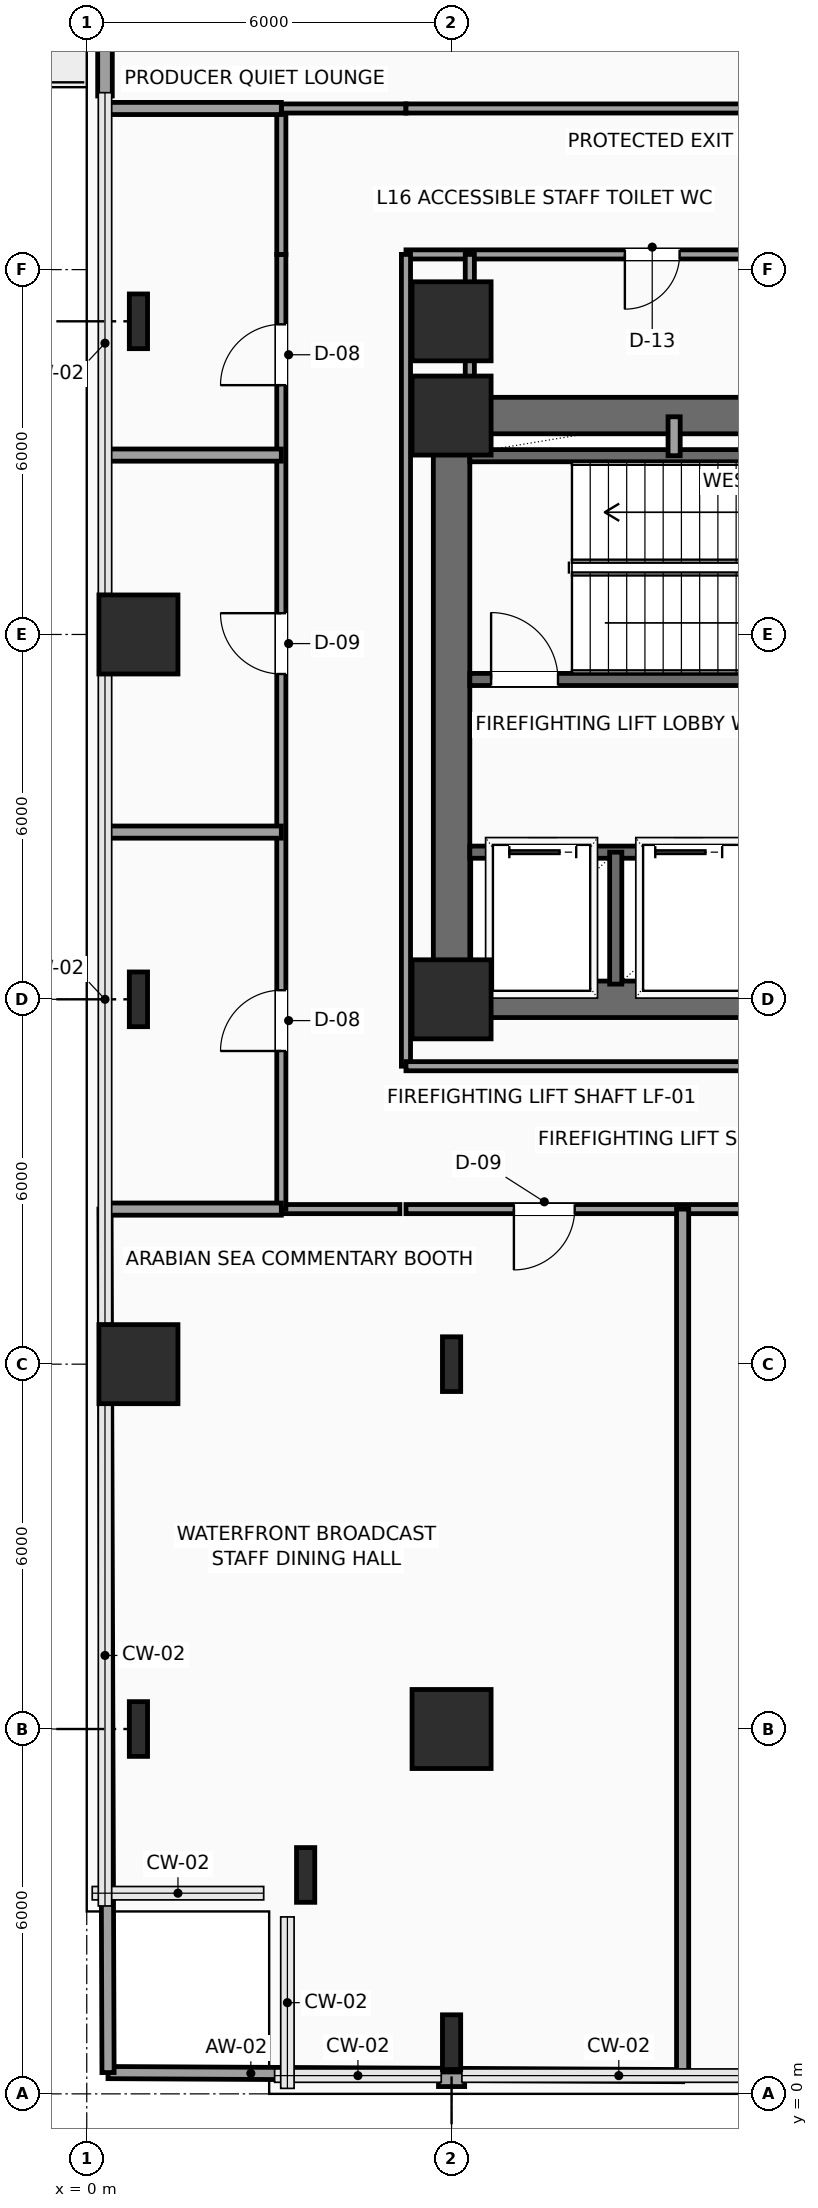
"""IFC4 building model, lengths in metres.
Left out: names, types, materials, properties, quantities, classifications, styles, units other than length and angle.
Written with IfcOpenShell. Run it as: python <this file> out.ifc"""

import sys

from ifc_helpers import new_model, si_unit, direction, frame, frame_2d, origin, origin_2d, place, context, subcontext, project, spatial, rectangle, i_section, extrude, element, fill, save


model = new_model("IFC4")
c1 = context("Model", 3, precision=1e-05, world=origin(), true_north=direction((0.0, 1.0)))
c2 = subcontext(c1, "Body", "Model", "MODEL_VIEW")
j1 = project(units=[si_unit("LENGTHUNIT", "METRE"), si_unit("PLANEANGLEUNIT", "RADIAN")], contexts=[c1])
p1 = place(None, origin())
s1 = spatial("IfcSite", under=j1, at=p1, CompositionType="ELEMENT")
p2 = place(p1, origin())
s2 = spatial("IfcBuilding", under=s1, at=p2, CompositionType="ELEMENT")
p3 = place(p2, frame((0.0, 0.0, 71.4)))
s3 = spatial("IfcBuildingStorey", under=s2, at=p3, CompositionType="ELEMENT", Elevation=71.4)
for number, where, z_axis, x_axis in (
    (1, (6.0, 18.0, 0.0), (0.0, 0.0, 1.0), (1.0, 0.0, 0.0)),
    (2, (6.0, 27.6, 0.0), (0.0, 0.0, 1.0), (1.0, 0.0, 0.0)),
):
    element("IfcColumn", number, at=place(p3, frame(where, z_axis=z_axis, x_axis=x_axis)), inside=s3, PredefinedType="COLUMN", context=c2, shape_type="SweptSolid", body=[
        extrude(rectangle(XDim=1.3, YDim=1.3, at=origin_2d()), origin(), (0.0, 0.0, 1.0), 3.9),
    ])
for number, where, z_axis, x_axis in (
    (3, (3.6, 3.6, 0.0), (0.0, 0.0, 1.0), (1.0, 0.0, 0.0)),
    (4, (0.85, 6.0, 0.0), (0.0, 0.0, 1.0), (1.0, 0.0, 0.0)),
):
    element("IfcColumn", number, at=place(p3, frame(where, z_axis=z_axis, x_axis=x_axis)), inside=s3, PredefinedType="COLUMN", context=c2, shape_type="SweptSolid", body=[
        extrude(i_section(OverallWidth=0.3, OverallDepth=0.9, WebThickness=0.019, FlangeThickness=0.035, FilletRadius=0.03, at=origin_2d()), origin(), (0.0, 0.0, 1.0), 3.9),
    ])
p4 = place(p3, frame((0.85, 12.0, 0.0), z_axis=(0.0, 0.0, 1.0), x_axis=(1.0, 0.0, 0.0)))
e5 = element("IfcColumn", 5, at=p4, inside=s3, PredefinedType="COLUMN", context=c2, shape_type="SweptSolid", body=[
    extrude(rectangle(XDim=1.3, YDim=1.3, at=origin_2d()), origin(), (0.0, 0.0, 1.0), 3.9),
])
p5 = place(p3, frame((0.85, 18.0, 0.0), z_axis=(0.0, 0.0, 1.0), x_axis=(1.0, 0.0, 0.0)))
e6 = element("IfcColumn", 6, at=p5, inside=s3, PredefinedType="COLUMN", context=c2, shape_type="SweptSolid", body=[
    extrude(i_section(OverallWidth=0.3, OverallDepth=0.9, WebThickness=0.019, FlangeThickness=0.035, FilletRadius=0.03, at=origin_2d()), origin(), (0.0, 0.0, 1.0), 3.9),
])
p6 = place(p3, frame((0.85, 24.0, 0.0), z_axis=(0.0, 0.0, 1.0), x_axis=(1.0, 0.0, 0.0)))
e7 = element("IfcColumn", 7, at=p6, inside=s3, PredefinedType="COLUMN", context=c2, shape_type="SweptSolid", body=[
    extrude(rectangle(XDim=1.3, YDim=1.3, at=origin_2d()), origin(), (0.0, 0.0, 1.0), 3.9),
])
for number, where, z_axis, x_axis in (
    (8, (0.85, 29.15, 0.0), (0.0, 0.0, 1.0), (1.0, 0.0, 0.0)),
    (9, (6.0, 0.85, 0.0), (0.0, 0.0, 1.0), (1.0, 0.0, 0.0)),
):
    element("IfcColumn", number, at=place(p3, frame(where, z_axis=z_axis, x_axis=x_axis)), inside=s3, PredefinedType="COLUMN", context=c2, shape_type="SweptSolid", body=[
        extrude(i_section(OverallWidth=0.3, OverallDepth=0.9, WebThickness=0.019, FlangeThickness=0.035, FilletRadius=0.03, at=origin_2d()), origin(), (0.0, 0.0, 1.0), 3.9),
    ])
p7 = place(p3, frame((6.0, 6.0, 0.0), z_axis=(0.0, 0.0, 1.0), x_axis=(1.0, 0.0, 0.0)))
e10 = element("IfcColumn", 10, at=p7, inside=s3, PredefinedType="COLUMN", context=c2, shape_type="SweptSolid", body=[
    extrude(rectangle(XDim=1.3, YDim=1.3, at=origin_2d()), origin(), (0.0, 0.0, 1.0), 3.9),
])
p8 = place(p3, frame((6.0, 12.0, 0.0), z_axis=(0.0, 0.0, 1.0), x_axis=(1.0, 0.0, 0.0)))
e11 = element("IfcColumn", 11, at=p8, inside=s3, PredefinedType="COLUMN", context=c2, shape_type="SweptSolid", body=[
    extrude(i_section(OverallWidth=0.3, OverallDepth=0.9, WebThickness=0.019, FlangeThickness=0.035, FilletRadius=0.03, at=origin_2d()), origin(), (0.0, 0.0, 1.0), 3.9),
])
p9 = place(p3, frame((6.0, 29.15, 0.0), z_axis=(0.0, 0.0, 1.0), x_axis=(1.0, 0.0, 0.0)))
e12 = element("IfcColumn", 12, at=p9, inside=s3, PredefinedType="COLUMN", context=c2, shape_type="SweptSolid", body=[
    extrude(rectangle(XDim=1.3, YDim=1.3, at=origin_2d()), origin(), (0.0, 0.0, 1.0), 3.9),
])
p10 = place(p3, frame((0.3, 32.855, 0.0), z_axis=(0.0, 0.0, 1.0), x_axis=(0.0, 1.0, 0.0)))
e13 = element("IfcWall", 13, at=p10, inside=s3, PredefinedType="SOLIDWALL", context=c2, shape_type="SweptSolid", body=[
    extrude(rectangle(XDim=9.29, YDim=0.24, at=frame_2d((4.645, 0.0))), origin(), (0.0, 0.0, 1.0), 3.65),
])
p11 = place(p10, frame((4.95, 0.0, 0.0)))
e14 = element("IfcOpeningElement", 14, at=p11, cuts=e13, PredefinedType="OPENING", context=c2, shape_type="SweptSolid", body=[
    extrude(rectangle(XDim=1.05, YDim=2.2, at=frame_2d((0.525, 1.1))), frame((0.0, 0.13, 0.0), z_axis=(0.0, -1.0, 0.0), x_axis=(1.0, 0.0, 0.0)), (0.0, 0.0, 1.0), 0.26),
])
p12 = place(p3, frame((6.215, 0.24, 0.0), z_axis=(0.0, 0.0, 1.0), x_axis=(-1.0, 0.0, 0.0)))
e15 = element("IfcWall", 15, at=p12, inside=s3, PredefinedType="SOLIDWALL", context=c2, shape_type="SweptSolid", body=[
    extrude(rectangle(XDim=0.43, YDim=0.24, at=frame_2d((0.215, 0.0))), origin(), (0.0, 0.0, 1.0), 3.65),
])
p13 = place(p3, frame((6.0, 18.0, 0.0), z_axis=(0.0, 0.0, 1.0), x_axis=(1.0, 0.0, 0.0)))
e16 = element("IfcWall", 16, at=p13, inside=s3, PredefinedType="SHEAR", context=c2, shape_type="SweptSolid", body=[
    extrude(rectangle(XDim=12.0, YDim=0.6, at=frame_2d((6.0, 0.0))), origin(), (0.0, 0.0, 1.0), 3.65),
])
p14 = place(p13, frame((7.15, 0.0, 0.0)))
e17 = element("IfcOpeningElement", 17, at=p14, cuts=e16, PredefinedType="OPENING", context=c2, shape_type="SweptSolid", body=[
    extrude(rectangle(XDim=1.6, YDim=2.3, at=frame_2d((0.8, 1.15))), frame((0.0, 0.31, 0.0), z_axis=(0.0, -1.0, 0.0), x_axis=(1.0, 0.0, 0.0)), (0.0, 0.0, 1.0), 0.62),
])
p15 = place(p3, frame((6.0, 27.6, 0.0), z_axis=(0.0, 0.0, 1.0), x_axis=(1.0, 0.0, 0.0)))
e18 = element("IfcWall", 18, at=p15, inside=s3, PredefinedType="SHEAR", context=c2, shape_type="SweptSolid", body=[
    extrude(rectangle(XDim=12.0, YDim=0.6, at=frame_2d((6.0, 0.0))), origin(), (0.0, 0.0, 1.0), 3.65),
])
p16 = place(p15, frame((10.2, 0.0, 0.0)))
e19 = element("IfcOpeningElement", 19, at=p16, cuts=e18, PredefinedType="OPENING", context=c2, shape_type="SweptSolid", body=[
    extrude(rectangle(XDim=0.9, YDim=2.15, at=frame_2d((0.45, 1.075))), frame((0.0, 0.31, 0.0), z_axis=(0.0, -1.0, 0.0), x_axis=(1.0, 0.0, 0.0)), (0.0, 0.0, 1.0), 0.62),
])
p17 = place(p3, frame((6.0, 18.0, 0.0), z_axis=(0.0, 0.0, 1.0), x_axis=(0.0, 1.0, 0.0)))
e20 = element("IfcWall", 20, at=p17, inside=s3, PredefinedType="SHEAR", context=c2, shape_type="SweptSolid", body=[
    extrude(rectangle(XDim=9.6, YDim=0.6, at=frame_2d((4.8, 0.0))), origin(), (0.0, 0.0, 1.0), 3.65),
])
p18 = place(p3, frame((6.3, 23.26, 0.0), z_axis=(0.0, 0.0, 1.0), x_axis=(1.0, 0.0, 0.0)))
e21 = element("IfcWall", 21, at=p18, inside=s3, PredefinedType="SHEAR", context=c2, shape_type="SweptSolid", body=[
    extrude(rectangle(XDim=8.88, YDim=0.2, at=frame_2d((4.44, 0.0))), origin(), (0.0, 0.0, 1.0), 3.65),
])
p19 = place(p18, frame((0.35, 0.0, 0.0)))
e22 = element("IfcOpeningElement", 22, at=p19, cuts=e21, PredefinedType="OPENING", context=c2, shape_type="SweptSolid", body=[
    extrude(rectangle(XDim=1.1, YDim=2.2, at=frame_2d((0.55, 1.1))), frame((0.0, 0.11, 0.0), z_axis=(0.0, -1.0, 0.0), x_axis=(1.0, 0.0, 0.0)), (0.0, 0.0, 1.0), 0.22),
])
p20 = place(p3, frame((6.3, 26.94, 0.0), z_axis=(0.0, 0.0, 1.0), x_axis=(1.0, 0.0, 0.0)))
e23 = element("IfcWall", 23, at=p20, inside=s3, PredefinedType="SHEAR", context=c2, shape_type="SweptSolid", body=[
    extrude(rectangle(XDim=8.88, YDim=0.2, at=frame_2d((4.44, 0.0))), origin(), (0.0, 0.0, 1.0), 3.65),
])
p21 = place(p3, frame((6.3, 20.42, 0.0), z_axis=(0.0, 0.0, 1.0), x_axis=(1.0, 0.0, 0.0)))
e24 = element("IfcWall", 24, at=p21, inside=s3, PredefinedType="SHEAR", context=c2, shape_type="SweptSolid", body=[
    extrude(rectangle(XDim=4.95, YDim=0.2, at=frame_2d((2.475, 0.0))), origin(), (0.0, 0.0, 1.0), 3.65),
])
p22 = place(p21, frame((0.65, 0.0, 0.0)))
e25 = element("IfcOpeningElement", 25, at=p22, cuts=e24, PredefinedType="OPENING", context=c2, shape_type="SweptSolid", body=[
    extrude(rectangle(XDim=1.1, YDim=2.2, at=frame_2d((0.55, 1.1))), frame((0.0, 0.11, 0.0), z_axis=(0.0, -1.0, 0.0), x_axis=(1.0, 0.0, 0.0)), (0.0, 0.0, 1.0), 0.22),
])
p23 = place(p21, frame((3.05, 0.0, 0.0)))
e26 = element("IfcOpeningElement", 26, at=p23, cuts=e24, PredefinedType="OPENING", context=c2, shape_type="SweptSolid", body=[
    extrude(rectangle(XDim=1.1, YDim=2.2, at=frame_2d((0.55, 1.1))), frame((0.0, 0.11, 0.0), z_axis=(0.0, -1.0, 0.0), x_axis=(1.0, 0.0, 0.0)), (0.0, 0.0, 1.0), 0.22),
])
p24 = place(p3, frame((8.7, 18.25, 0.0), z_axis=(0.0, 0.0, 1.0), x_axis=(0.0, 1.0, 0.0)))
e27 = element("IfcWall", 27, at=p24, inside=s3, PredefinedType="SHEAR", context=c2, shape_type="SweptSolid", body=[
    extrude(rectangle(XDim=2.17, YDim=0.2, at=frame_2d((1.085, 0.0))), origin(), (0.0, 0.0, 1.0), 3.65),
])
p25 = place(p3, frame((9.66, 26.94, 0.0), z_axis=(0.0, 0.0, 1.0), x_axis=(0.0, 1.0, 0.0)))
e28 = element("IfcWall", 28, at=p25, inside=s3, PredefinedType="SOLIDWALL", context=c2, shape_type="SweptSolid", body=[
    extrude(rectangle(XDim=0.64, YDim=0.2, at=frame_2d((0.32, 0.0))), origin(), (0.0, 0.0, 1.0), 3.65),
])
p26 = place(p3, frame((12.4, 14.55, 0.0), z_axis=(0.0, 0.0, 1.0), x_axis=(-1.0, 0.0, 0.0)))
e29 = element("IfcWall", 29, at=p26, inside=s3, PredefinedType="PARTITIONING", context=c2, shape_type="SweptSolid", body=[
    extrude(rectangle(XDim=7.15, YDim=0.15, at=frame_2d((3.575, 0.0))), origin(), (0.0, 0.0, 1.0), 3.65),
])
p27 = place(p26, frame((4.375, 0.0, 0.0)))
e30 = element("IfcOpeningElement", 30, at=p27, cuts=e29, PredefinedType="OPENING", context=c2, shape_type="SweptSolid", body=[
    extrude(rectangle(XDim=1.0, YDim=2.2, at=frame_2d((0.5, 1.1))), frame((0.0, 0.085, 0.0), z_axis=(0.0, -1.0, 0.0), x_axis=(1.0, 0.0, 0.0)), (0.0, 0.0, 1.0), 0.17),
])
p28 = place(p3, frame((5.15, 14.55, 0.0), z_axis=(0.0, 0.0, 1.0), x_axis=(-1.0, 0.0, 0.0)))
e31 = element("IfcWall", 31, at=p28, inside=s3, PredefinedType="PARTITIONING", context=c2, shape_type="SweptSolid", body=[
    extrude(rectangle(XDim=1.95, YDim=0.15, at=frame_2d((0.975, 0.0))), origin(), (0.0, 0.0, 1.0), 3.65),
])
p29 = place(p3, frame((3.2, 14.55, 0.0), z_axis=(0.0, 0.0, 1.0), x_axis=(0.0, 1.0, 0.0)))
e32 = element("IfcWall", 32, at=p29, inside=s3, PredefinedType="PARTITIONING", context=c2, shape_type="SweptSolid", body=[
    extrude(rectangle(XDim=15.7, YDim=0.15, at=frame_2d((7.85, 0.0))), origin(), (0.0, 0.0, 1.0), 3.65),
])
p30 = place(p29, frame((2.6, 0.0, 0.0)))
e33 = element("IfcOpeningElement", 33, at=p30, cuts=e32, PredefinedType="OPENING", context=c2, shape_type="SweptSolid", body=[
    extrude(rectangle(XDim=1.0, YDim=2.2, at=frame_2d((0.5, 1.1))), frame((0.0, 0.085, 0.0), z_axis=(0.0, -1.0, 0.0), x_axis=(1.0, 0.0, 0.0)), (0.0, 0.0, 1.0), 0.17),
])
p31 = place(p29, frame((8.8, 0.0, 0.0)))
e34 = element("IfcOpeningElement", 34, at=p31, cuts=e32, PredefinedType="OPENING", context=c2, shape_type="SweptSolid", body=[
    extrude(rectangle(XDim=1.0, YDim=2.2, at=frame_2d((0.5, 1.1))), frame((0.0, 0.085, 0.0), z_axis=(0.0, -1.0, 0.0), x_axis=(1.0, 0.0, 0.0)), (0.0, 0.0, 1.0), 0.17),
])
p32 = place(p29, frame((13.55, 0.0, 0.0)))
e35 = element("IfcOpeningElement", 35, at=p32, cuts=e32, PredefinedType="OPENING", context=c2, shape_type="SweptSolid", body=[
    extrude(rectangle(XDim=1.0, YDim=2.2, at=frame_2d((0.5, 1.1))), frame((0.0, 0.085, 0.0), z_axis=(0.0, -1.0, 0.0), x_axis=(1.0, 0.0, 0.0)), (0.0, 0.0, 1.0), 0.17),
])
p33 = place(p3, frame((3.2, 30.25, 0.0), z_axis=(0.0, 0.0, 1.0), x_axis=(0.0, 1.0, 0.0)))
e36 = element("IfcWall", 36, at=p33, inside=s3, PredefinedType="PARTITIONING", context=c2, shape_type="SweptSolid", body=[
    extrude(rectangle(XDim=2.4, YDim=0.15, at=frame_2d((1.2, 0.0))), origin(), (0.0, 0.0, 1.0), 3.65),
])
p34 = place(p3, frame((3.2, 32.65, 0.0), z_axis=(0.0, 0.0, 1.0), x_axis=(1.0, 0.0, 0.0)))
e37 = element("IfcWall", 37, at=p34, inside=s3, PredefinedType="PARTITIONING", context=c2, shape_type="SweptSolid", body=[
    extrude(rectangle(XDim=2.05, YDim=0.15, at=frame_2d((1.025, 0.0))), origin(), (0.0, 0.0, 1.0), 3.65),
])
p35 = place(p3, frame((5.25, 32.65, 0.0), z_axis=(0.0, 0.0, 1.0), x_axis=(1.0, 0.0, 0.0)))
e38 = element("IfcWall", 38, at=p35, inside=s3, PredefinedType="PARTITIONING", context=c2, shape_type="SweptSolid", body=[
    extrude(rectangle(XDim=8.55, YDim=0.15, at=frame_2d((4.275, 0.0))), origin(), (0.0, 0.0, 1.0), 3.65),
])
p36 = place(p3, frame((15.88, 30.25, 0.0), z_axis=(0.0, 0.0, 1.0), x_axis=(-1.0, 0.0, 0.0)))
e39 = element("IfcWall", 39, at=p36, inside=s3, PredefinedType="PARTITIONING", context=c2, shape_type="SweptSolid", body=[
    extrude(rectangle(XDim=10.63, YDim=0.15, at=frame_2d((5.315, 0.0))), origin(), (0.0, 0.0, 1.0), 3.65),
])
p37 = place(p36, frame((6.13, 0.0, 0.0)))
e40 = element("IfcOpeningElement", 40, at=p37, cuts=e39, PredefinedType="OPENING", context=c2, shape_type="SweptSolid", body=[
    extrude(rectangle(XDim=0.9, YDim=2.1, at=frame_2d((0.45, 1.05))), frame((0.0, 0.085, 0.0), z_axis=(0.0, -1.0, 0.0), x_axis=(1.0, 0.0, 0.0)), (0.0, 0.0, 1.0), 0.17),
])
p38 = place(p3, frame((5.25, 30.25, 0.0), z_axis=(0.0, 0.0, 1.0), x_axis=(0.0, -1.0, 0.0)))
e41 = element("IfcWall", 41, at=p38, inside=s3, PredefinedType="PARTITIONING", context=c2, shape_type="SweptSolid", body=[
    extrude(rectangle(XDim=13.35, YDim=0.15, at=frame_2d((6.675, 0.0))), origin(), (0.0, 0.0, 1.0), 3.65),
])
p39 = place(p3, frame((5.25, 16.9, 0.0), z_axis=(0.0, 0.0, 1.0), x_axis=(1.0, 0.0, 0.0)))
e42 = element("IfcWall", 42, at=p39, inside=s3, PredefinedType="PARTITIONING", context=c2, shape_type="SweptSolid", body=[
    extrude(rectangle(XDim=7.15, YDim=0.15, at=frame_2d((3.575, 0.0))), origin(), (0.0, 0.0, 1.0), 3.65),
])
p40 = place(p3, frame((6.3, 27.68, 0.0), z_axis=(0.0, 0.0, 1.0), x_axis=(0.0, 1.0, 0.0)))
e43 = element("IfcWall", 43, at=p40, inside=s3, PredefinedType="PARTITIONING", context=c2, shape_type="SweptSolid", body=[
    extrude(rectangle(XDim=2.57, YDim=0.15, at=frame_2d((1.285, 0.0))), origin(), (0.0, 0.0, 1.0), 2.992),
])
p41 = place(p3, frame((0.35, 0.35, 0.0), z_axis=(0.0, 0.0, 1.0), x_axis=(0.99998595132, -0.005300675722, 0.0)))
e44 = element("IfcWall", 44, at=p41, inside=s3, PredefinedType="PARTITIONING", context=c2, shape_type="SweptSolid", body=[
    extrude(rectangle(XDim=5.435, YDim=0.2, at=frame_2d((2.717, 0.0))), origin(), (0.0, 0.0, 1.0), 3.65),
])
p42 = place(p3, frame((6.215, 0.319, 0.0), z_axis=(0.0, 0.0, 1.0), x_axis=(0.999985892136, -0.005311829174, 0.0)))
e45 = element("IfcWall", 45, at=p42, inside=s3, PredefinedType="PARTITIONING", context=c2, shape_type="SweptSolid", body=[
    extrude(rectangle(XDim=3.585, YDim=0.2, at=frame_2d((1.792, 0.0))), origin(), (0.0, 0.0, 1.0), 3.65),
])
p43 = place(p3, frame((0.35, 0.35, 0.0), z_axis=(0.0, 0.0, 1.0), x_axis=(-0.003524555588, 0.999993788735, 0.0)))
e46 = element("IfcWall", 46, at=p43, inside=s3, PredefinedType="PARTITIONING", context=c2, shape_type="SweptSolid", body=[
    extrude(rectangle(XDim=14.2, YDim=0.2, at=frame_2d((7.1, 0.0))), origin(), (0.0, 0.0, 1.0), 3.65),
])
p44 = place(p3, frame((9.8, 0.3, 0.0), z_axis=(0.0, 0.0, 1.0), x_axis=(0.0, 1.0, 0.0)))
e47 = element("IfcWall", 47, at=p44, inside=s3, PredefinedType="PARTITIONING", context=c2, shape_type="SweptSolid", body=[
    extrude(rectangle(XDim=14.25, YDim=0.2, at=frame_2d((7.125, 0.0))), origin(), (0.0, 0.0, 1.0), 3.65),
])
p45 = place(p3, frame((0.3, 14.55, 0.0), z_axis=(0.0, 0.0, 1.0), x_axis=(1.0, 0.0, 0.0)))
e48 = element("IfcWall", 48, at=p45, inside=s3, PredefinedType="PARTITIONING", context=c2, shape_type="SweptSolid", body=[
    extrude(rectangle(XDim=2.9, YDim=0.2, at=frame_2d((1.45, 0.0))), origin(), (0.0, 0.0, 1.0), 3.65),
])
p46 = place(p3, frame((0.3, 20.75, 0.0), z_axis=(0.0, 0.0, 1.0), x_axis=(1.0, 0.0, 0.0)))
e49 = element("IfcWall", 49, at=p46, inside=s3, PredefinedType="PARTITIONING", context=c2, shape_type="SweptSolid", body=[
    extrude(rectangle(XDim=2.9, YDim=0.2, at=frame_2d((1.45, 0.0))), origin(), (0.0, 0.0, 1.0), 3.142),
])
for number, where, z_axis, x_axis in (
    (50, (0.3, 26.95, 0.0), (0.0, 0.0, 1.0), (1.0, 0.0, 0.0)),
    (51, (0.3, 32.65, 0.0), (0.0, 0.0, 1.0), (1.0, 0.0, 0.0)),
):
    element("IfcWall", number, at=place(p3, frame(where, z_axis=z_axis, x_axis=x_axis)), inside=s3, PredefinedType="PARTITIONING", context=c2, shape_type="SweptSolid", body=[
        extrude(rectangle(XDim=2.9, YDim=0.2, at=frame_2d((1.45, 0.0))), origin(), (0.0, 0.0, 1.0), 3.65),
    ])
p47 = place(p19, origin())
e52 = element("IfcDoor", 52, at=p47, inside=s3, OperationType="SINGLE_SWING_LEFT", PredefinedType="DOOR", context=c2, shape_type="SweptSolid", body=[
    extrude(rectangle(XDim=1.1, YDim=2.2, at=frame_2d((0.55, 1.1))), frame((0.0, 0.025, 0.0), z_axis=(0.0, -1.0, 0.0), x_axis=(1.0, 0.0, 0.0)), (0.0, 0.0, 1.0), 0.05),
])
fill(e22, e52)
p48 = place(p22, origin())
e53 = element("IfcDoor", 53, at=p48, inside=s3, OperationType="SLIDING_TO_LEFT", PredefinedType="DOOR", context=c2, shape_type="SweptSolid", body=[
    extrude(rectangle(XDim=1.1, YDim=2.2, at=frame_2d((0.55, 1.1))), frame((0.0, 0.025, 0.0), z_axis=(0.0, -1.0, 0.0), x_axis=(1.0, 0.0, 0.0)), (0.0, 0.0, 1.0), 0.05),
])
fill(e25, e53)
p49 = place(p23, origin())
e54 = element("IfcDoor", 54, at=p49, inside=s3, OperationType="SLIDING_TO_LEFT", PredefinedType="DOOR", context=c2, shape_type="SweptSolid", body=[
    extrude(rectangle(XDim=1.1, YDim=2.2, at=frame_2d((0.55, 1.1))), frame((0.0, 0.025, 0.0), z_axis=(0.0, -1.0, 0.0), x_axis=(1.0, 0.0, 0.0)), (0.0, 0.0, 1.0), 0.05),
])
fill(e26, e54)
p50 = place(p27, origin())
e55 = element("IfcDoor", 55, at=p50, inside=s3, OperationType="SINGLE_SWING_RIGHT", PredefinedType="DOOR", context=c2, shape_type="SweptSolid", body=[
    extrude(rectangle(XDim=1.0, YDim=2.2, at=frame_2d((0.5, 1.1))), frame((0.0, 0.025, 0.0), z_axis=(0.0, -1.0, 0.0), x_axis=(1.0, 0.0, 0.0)), (0.0, 0.0, 1.0), 0.05),
])
fill(e30, e55)
p51 = place(p30, origin())
e56 = element("IfcDoor", 56, at=p51, inside=s3, OperationType="SINGLE_SWING_LEFT", PredefinedType="DOOR", context=c2, shape_type="SweptSolid", body=[
    extrude(rectangle(XDim=1.0, YDim=2.2, at=frame_2d((0.5, 1.1))), frame((0.0, 0.025, 0.0), z_axis=(0.0, -1.0, 0.0), x_axis=(1.0, 0.0, 0.0)), (0.0, 0.0, 1.0), 0.05),
])
fill(e33, e56)
p52 = place(p31, origin())
e57 = element("IfcDoor", 57, at=p52, inside=s3, OperationType="SINGLE_SWING_RIGHT", PredefinedType="DOOR", context=c2, shape_type="SweptSolid", body=[
    extrude(rectangle(XDim=1.0, YDim=2.2, at=frame_2d((0.5, 1.1))), frame((0.0, 0.025, 0.0), z_axis=(0.0, -1.0, 0.0), x_axis=(1.0, 0.0, 0.0)), (0.0, 0.0, 1.0), 0.05),
])
fill(e34, e57)
p53 = place(p32, origin())
e58 = element("IfcDoor", 58, at=p53, inside=s3, OperationType="SINGLE_SWING_LEFT", PredefinedType="DOOR", context=c2, shape_type="SweptSolid", body=[
    extrude(rectangle(XDim=1.0, YDim=2.2, at=frame_2d((0.5, 1.1))), frame((0.0, 0.025, 0.0), z_axis=(0.0, -1.0, 0.0), x_axis=(1.0, 0.0, 0.0)), (0.0, 0.0, 1.0), 0.05),
])
fill(e35, e58)
p54 = place(p37, origin())
e59 = element("IfcDoor", 59, at=p54, inside=s3, OperationType="SINGLE_SWING_RIGHT", PredefinedType="DOOR", context=c2, shape_type="SweptSolid", body=[
    extrude(rectangle(XDim=0.9, YDim=2.1, at=frame_2d((0.45, 1.05))), frame((0.0, 0.025, 0.0), z_axis=(0.0, -1.0, 0.0), x_axis=(1.0, 0.0, 0.0)), (0.0, 0.0, 1.0), 0.05),
])
fill(e40, e59)
save(model, sys.argv[1])
